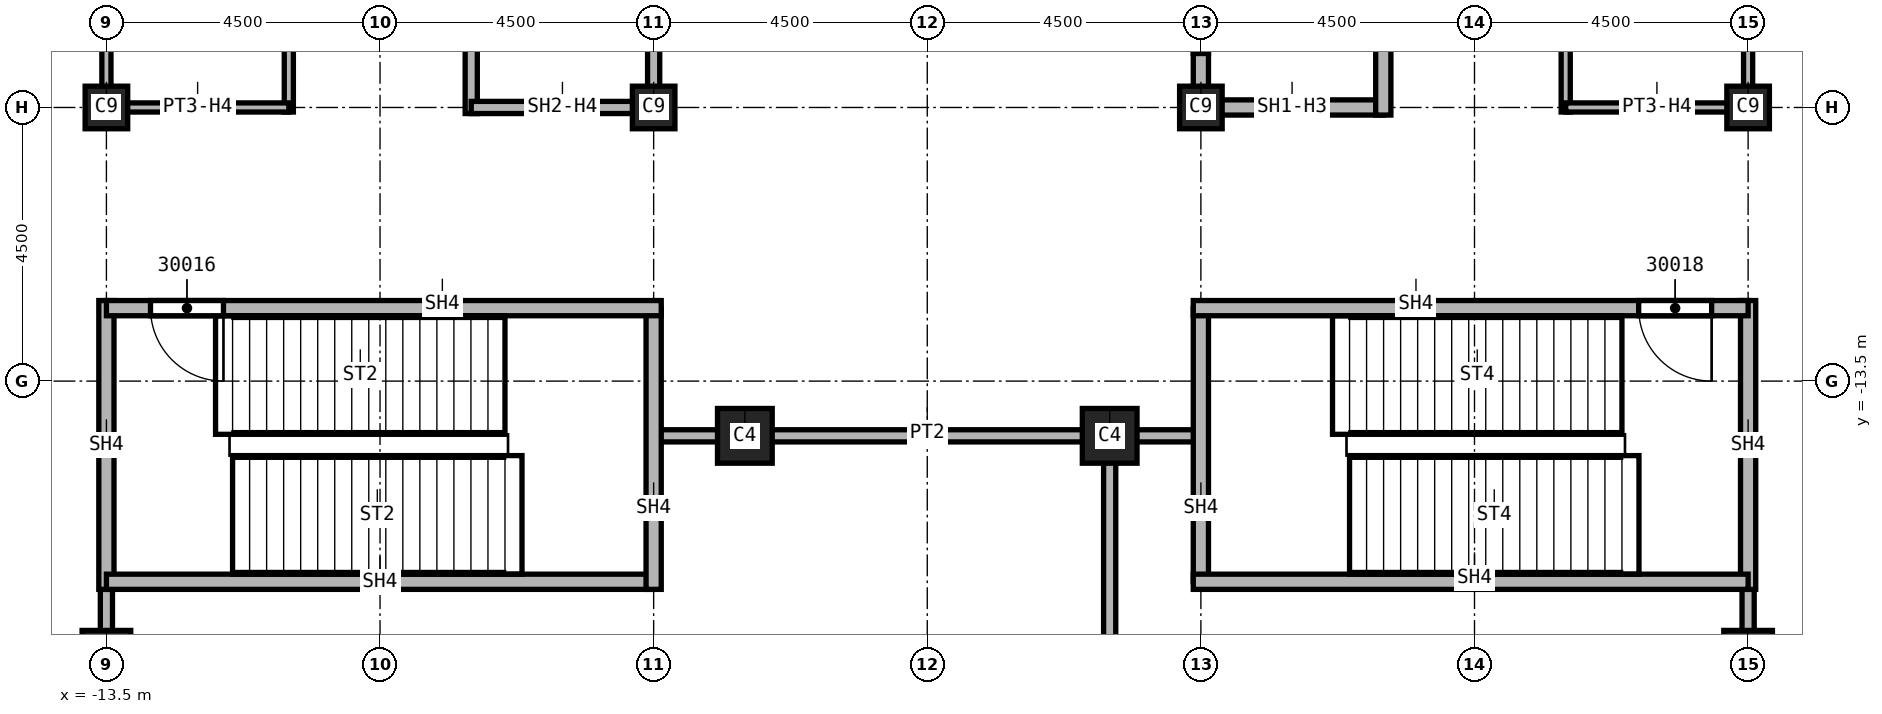
"""IFC4 building model, lengths in metres.
Left out: names, types, materials, properties, quantities, classifications, styles, units other than length and angle.
Written with IfcOpenShell. Run it as: python <this file> out.ifc"""

import sys

from ifc_helpers import new_model, si_unit, direction, frame, frame_2d, origin, origin_2d, place, context, subcontext, project, spatial, rectangle, extrude, element, fill, save


model = new_model("IFC4")
c1 = context("Model", 3, precision=1e-05, world=origin(), true_north=direction((0.0, 1.0)))
c2 = subcontext(c1, "Body", "Model", "MODEL_VIEW")
j1 = project(units=[si_unit("LENGTHUNIT", "METRE"), si_unit("PLANEANGLEUNIT", "RADIAN")], contexts=[c1])
p1 = place(None, origin())
s1 = spatial("IfcSite", under=j1, at=p1, CompositionType="ELEMENT")
p2 = place(p1, origin())
s2 = spatial("IfcBuilding", under=s1, at=p2, CompositionType="ELEMENT")
p3 = place(p2, frame((0.0, 0.0, 320.0)))
s3 = spatial("IfcBuildingStorey", under=s2, at=p3, CompositionType="ELEMENT", Elevation=320.0)
for number, where, z_axis, x_axis in (
    (1, (13.5, -18.0, 0.0), (0.0, 0.0, 1.0), (1.0, 0.0, 0.0)),
    (2, (-13.5, -18.0, 0.0), (0.0, 0.0, 1.0), (1.0, 0.0, 0.0)),
):
    element("IfcColumn", number, at=place(p3, frame(where, z_axis=z_axis, x_axis=x_axis)), inside=s3, PredefinedType="COLUMN", context=c2, shape_type="SweptSolid", body=[
        extrude(rectangle(XDim=0.8, YDim=0.8, at=origin_2d()), origin(), (0.0, 0.0, 1.0), 5.74),
    ])
for number, where, z_axis, x_axis in (
    (3, (4.5, -9.0, 0.0), (0.0, 0.0, 1.0), (1.0, 0.0, 0.0)),
    (4, (13.5, -9.0, 0.0), (0.0, 0.0, 1.0), (1.0, 0.0, 0.0)),
    (5, (-4.5, -9.0, 0.0), (0.0, 0.0, 1.0), (1.0, 0.0, 0.0)),
    (6, (-13.5, -9.0, 0.0), (0.0, 0.0, 1.0), (1.0, 0.0, 0.0)),
):
    element("IfcColumn", number, at=place(p3, frame(where, z_axis=z_axis, x_axis=x_axis)), inside=s3, PredefinedType="COLUMN", context=c2, shape_type="SweptSolid", body=[
        extrude(rectangle(XDim=0.7, YDim=0.7, at=origin_2d()), origin(), (0.0, 0.0, 1.0), 5.74),
    ])
for number, where, z_axis, x_axis in (
    (7, (3.0, -14.4, 0.0), (0.0, -0.329, 0.944), (1.0, 0.0, 0.0)),
    (8, (-3.0, -14.4, 0.0), (0.0, -0.329, 0.944), (1.0, 0.0, 0.0)),
):
    element("IfcColumn", number, at=place(p3, frame(where, z_axis=z_axis, x_axis=x_axis)), inside=s3, PredefinedType="COLUMN", context=c2, shape_type="SweptSolid", body=[
        extrude(rectangle(XDim=0.9, YDim=0.9, at=origin_2d()), origin(), (0.0, 0.0, 1.0), 6.078),
    ])
p4 = place(p3, frame((-13.5, -16.675, 0.0), z_axis=(0.0, 0.0, 1.0), x_axis=(0.0, -1.0, 0.0)))
e9 = element("IfcWall", 9, at=p4, inside=s3, PredefinedType="PARTITIONING", context=c2, shape_type="SweptSolid", body=[
    extrude(rectangle(XDim=6.275, YDim=0.2, at=frame_2d((3.137, 0.0))), origin(), (0.0, 0.0, 1.0), 5.74),
])
p5 = place(p4, frame((2.65, 0.0, 0.0)))
e10 = element("IfcOpeningElement", 10, at=p5, cuts=e9, PredefinedType="OPENING", context=c2, shape_type="SweptSolid", body=[
    extrude(rectangle(XDim=1.0, YDim=2.1, at=frame_2d((0.5, 1.05))), frame((0.0, 0.1, 0.0), z_axis=(0.0, -1.0, 0.0), x_axis=(1.0, 0.0, 0.0)), (0.0, 0.0, 1.0), 0.2),
])
p6 = place(p3, frame((4.5, -14.4, 0.0), z_axis=(0.0, 0.0, 1.0), x_axis=(-1.0, 0.0, 0.0)))
e11 = element("IfcWall", 11, at=p6, inside=s3, PredefinedType="PARTITIONING", context=c2, shape_type="SweptSolid", body=[
    extrude(rectangle(XDim=9.0, YDim=0.2, at=frame_2d((4.5, 0.0))), origin(), (0.0, 0.0, 1.0), 5.74),
])
p7 = place(p3, frame((3.0, -14.4, 0.0), z_axis=(0.0, 0.0, 1.0), x_axis=(0.0, -1.0, 0.0)))
e12 = element("IfcWall", 12, at=p7, inside=s3, PredefinedType="PARTITIONING", context=c2, shape_type="SweptSolid", body=[
    extrude(rectangle(XDim=8.55, YDim=0.2, at=frame_2d((4.275, 0.0))), origin(), (0.0, 0.0, 1.0), 5.74),
])
p8 = place(p3, frame((13.5, -22.95, 0.0), z_axis=(0.0, 0.0, 1.0), x_axis=(0.0, 1.0, 0.0)))
e13 = element("IfcWall", 13, at=p8, inside=s3, PredefinedType="PARTITIONING", context=c2, shape_type="SweptSolid", body=[
    extrude(rectangle(XDim=6.275, YDim=0.2, at=frame_2d((3.137, 0.0))), origin(), (0.0, 0.0, 1.0), 5.74),
])
p9 = place(p8, frame((1.75, 0.0, 0.0)))
e14 = element("IfcOpeningElement", 14, at=p9, cuts=e13, PredefinedType="OPENING", context=c2, shape_type="SweptSolid", body=[
    extrude(rectangle(XDim=1.0, YDim=2.1, at=frame_2d((0.5, 1.05))), frame((0.0, 0.1, 0.0), z_axis=(0.0, -1.0, 0.0), x_axis=(1.0, 0.0, 0.0)), (0.0, 0.0, 1.0), 0.2),
])
p10 = place(p3, frame((-7.5, -9.1, 0.0), z_axis=(0.0, 0.0, 1.0), x_axis=(0.0, 1.0, 0.0)))
e15 = element("IfcWall", 15, at=p10, inside=s3, PredefinedType="SOLIDWALL", context=c2, shape_type="SweptSolid", body=[
    extrude(rectangle(XDim=6.225, YDim=0.2, at=frame_2d((3.113, 0.0))), origin(), (0.0, 0.0, 1.0), 5.74),
])
p11 = place(p3, frame((-4.5, -9.0, 0.0), z_axis=(0.0, 0.0, 1.0), x_axis=(-1.0, 0.0, 0.0)))
e16 = element("IfcWall", 16, at=p11, inside=s3, PredefinedType="SOLIDWALL", context=c2, shape_type="SweptSolid", body=[
    extrude(rectangle(XDim=3.0, YDim=0.2, at=frame_2d((1.5, 0.0))), origin(), (0.0, 0.0, 1.0), 5.062),
])
p12 = place(p3, frame((-4.5, 6.0, 0.0), z_axis=(0.0, 0.0, 1.0), x_axis=(0.0, -1.0, 0.0)))
e17 = element("IfcWall", 17, at=p12, inside=s3, PredefinedType="SOLIDWALL", context=c2, shape_type="SweptSolid", body=[
    extrude(rectangle(XDim=15.1, YDim=0.2, at=frame_2d((7.55, 0.0))), origin(), (0.0, 0.0, 1.0), 5.062),
])
p13 = place(p12, frame((6.85, 0.0, 0.0)))
e18 = element("IfcOpeningElement", 18, at=p13, cuts=e17, PredefinedType="OPENING", context=c2, shape_type="SweptSolid", body=[
    extrude(rectangle(XDim=1.1, YDim=2.1, at=frame_2d((0.55, 1.05))), frame((0.0, 0.1, 0.0), z_axis=(0.0, -1.0, 0.0), x_axis=(1.0, 0.0, 0.0)), (0.0, 0.0, 1.0), 0.2),
])
p14 = place(p12, frame((1.6, 0.0, 0.0)))
e19 = element("IfcOpeningElement", 19, at=p14, cuts=e17, PredefinedType="OPENING", context=c2, shape_type="SweptSolid", body=[
    extrude(rectangle(XDim=1.1, YDim=2.1, at=frame_2d((0.55, 1.05))), frame((0.0, 0.1, 0.0), z_axis=(0.0, -1.0, 0.0), x_axis=(1.0, 0.0, 0.0)), (0.0, 0.0, 1.0), 0.2),
])
p15 = place(p3, frame((4.5, -9.125, 0.0), z_axis=(0.0, 0.0, 1.0), x_axis=(0.0, 1.0, 0.0)))
e20 = element("IfcWall", 20, at=p15, inside=s3, PredefinedType="SOLIDWALL", context=c2, shape_type="SweptSolid", body=[
    extrude(rectangle(XDim=3.125, YDim=0.25, at=frame_2d((1.562, 0.0))), origin(), (0.0, 0.0, 1.0), 5.062),
])
p16 = place(p15, frame((1.012, 0.0, 0.0)))
e21 = element("IfcOpeningElement", 21, at=p16, cuts=e20, PredefinedType="OPENING", context=c2, shape_type="SweptSolid", body=[
    extrude(rectangle(XDim=1.1, YDim=2.1, at=frame_2d((0.55, 1.05))), frame((0.0, 0.125, 0.0), z_axis=(0.0, -1.0, 0.0), x_axis=(1.0, 0.0, 0.0)), (0.0, 0.0, 1.0), 0.25),
])
p17 = place(p3, frame((7.5, -9.0, 0.0), z_axis=(0.0, 0.0, 1.0), x_axis=(-1.0, 0.0, 0.0)))
e22 = element("IfcWall", 22, at=p17, inside=s3, PredefinedType="SOLIDWALL", context=c2, shape_type="SweptSolid", body=[
    extrude(rectangle(XDim=3.0, YDim=0.25, at=frame_2d((1.5, 0.0))), origin(), (0.0, 0.0, 1.0), 5.062),
])
p18 = place(p3, frame((7.5, -6.0, 0.0), z_axis=(0.0, 0.0, 1.0), x_axis=(0.0, -1.0, 0.0)))
e23 = element("IfcWall", 23, at=p18, inside=s3, PredefinedType="SOLIDWALL", context=c2, shape_type="SweptSolid", body=[
    extrude(rectangle(XDim=3.125, YDim=0.25, at=frame_2d((1.562, 0.0))), origin(), (0.0, 0.0, 1.0), 5.74),
])
p19 = place(p3, frame((-13.5, -12.175, 0.0), z_axis=(0.0, 0.0, 1.0), x_axis=(0.0, -1.0, 0.0)))
e24 = element("IfcWall", 24, at=p19, inside=s3, PredefinedType="SOLIDWALL", context=c2, shape_type="SweptSolid", body=[
    extrude(rectangle(XDim=4.75, YDim=0.25, at=frame_2d((2.375, 0.0))), origin(), (0.0, 0.0, 1.0), 5.74),
])
p20 = place(p3, frame((-4.5, -16.8, 0.0), z_axis=(0.0, 0.0, 1.0), x_axis=(-1.0, 0.0, 0.0)))
e25 = element("IfcWall", 25, at=p20, inside=s3, PredefinedType="SOLIDWALL", context=c2, shape_type="SweptSolid", body=[
    extrude(rectangle(XDim=9.0, YDim=0.25, at=frame_2d((4.5, 0.0))), origin(), (0.0, 0.0, 1.0), 5.74),
])
p21 = place(p3, frame((-4.5, -12.3, 0.0), z_axis=(0.0, 0.0, 1.0), x_axis=(0.0, -1.0, 0.0)))
e26 = element("IfcWall", 26, at=p21, inside=s3, PredefinedType="SOLIDWALL", context=c2, shape_type="SweptSolid", body=[
    extrude(rectangle(XDim=4.625, YDim=0.25, at=frame_2d((2.312, 0.0))), origin(), (0.0, 0.0, 1.0), 5.74),
])
p22 = place(p3, frame((-4.375, -12.3, 0.0), z_axis=(0.0, 0.0, 1.0), x_axis=(-1.0, 0.0, 0.0)))
e27 = element("IfcWall", 27, at=p22, inside=s3, PredefinedType="SOLIDWALL", context=c2, shape_type="SweptSolid", body=[
    extrude(rectangle(XDim=9.125, YDim=0.25, at=frame_2d((4.562, 0.0))), origin(), (0.0, 0.0, 1.0), 5.74),
])
p23 = place(p22, frame((7.2, 0.0, 0.0)))
e28 = element("IfcOpeningElement", 28, at=p23, cuts=e27, PredefinedType="OPENING", context=c2, shape_type="SweptSolid", body=[
    extrude(rectangle(XDim=1.2, YDim=2.1, at=frame_2d((0.6, 1.05))), frame((0.0, 0.125, 0.0), z_axis=(0.0, -1.0, 0.0), x_axis=(1.0, 0.0, 0.0)), (0.0, 0.0, 1.0), 0.25),
])
p24 = place(p3, frame((4.5, -16.8, 0.0), z_axis=(0.0, 0.0, 1.0), x_axis=(0.0, 1.0, 0.0)))
e29 = element("IfcWall", 29, at=p24, inside=s3, PredefinedType="SOLIDWALL", context=c2, shape_type="SweptSolid", body=[
    extrude(rectangle(XDim=4.5, YDim=0.25, at=frame_2d((2.25, 0.0))), origin(), (0.0, 0.0, 1.0), 5.74),
])
p25 = place(p3, frame((13.5, -16.925, 0.0), z_axis=(0.0, 0.0, 1.0), x_axis=(0.0, 1.0, 0.0)))
e30 = element("IfcWall", 30, at=p25, inside=s3, PredefinedType="SOLIDWALL", context=c2, shape_type="SweptSolid", body=[
    extrude(rectangle(XDim=4.75, YDim=0.25, at=frame_2d((2.375, 0.0))), origin(), (0.0, 0.0, 1.0), 5.74),
])
p26 = place(p3, frame((13.5, -16.8, 0.0), z_axis=(0.0, 0.0, 1.0), x_axis=(-1.0, 0.0, 0.0)))
e31 = element("IfcWall", 31, at=p26, inside=s3, PredefinedType="SOLIDWALL", context=c2, shape_type="SweptSolid", body=[
    extrude(rectangle(XDim=9.125, YDim=0.25, at=frame_2d((4.562, 0.0))), origin(), (0.0, 0.0, 1.0), 5.74),
])
p27 = place(p3, frame((13.5, -12.3, 0.0), z_axis=(0.0, 0.0, 1.0), x_axis=(-1.0, 0.0, 0.0)))
e32 = element("IfcWall", 32, at=p27, inside=s3, PredefinedType="SOLIDWALL", context=c2, shape_type="SweptSolid", body=[
    extrude(rectangle(XDim=9.125, YDim=0.25, at=frame_2d((4.562, 0.0))), origin(), (0.0, 0.0, 1.0), 5.74),
])
p28 = place(p27, frame((0.6, 0.0, 0.0)))
e33 = element("IfcOpeningElement", 33, at=p28, cuts=e32, PredefinedType="OPENING", context=c2, shape_type="SweptSolid", body=[
    extrude(rectangle(XDim=1.2, YDim=2.1, at=frame_2d((0.6, 1.05))), frame((0.0, 0.125, 0.0), z_axis=(0.0, -1.0, 0.0), x_axis=(1.0, 0.0, 0.0)), (0.0, 0.0, 1.0), 0.25),
])
p29 = place(p3, frame((-13.5, -9.075, 0.0), z_axis=(0.0, 0.0, 1.0), x_axis=(0.0, 1.0, 0.0)))
e34 = element("IfcWall", 34, at=p29, inside=s3, PredefinedType="PARTITIONING", context=c2, shape_type="SweptSolid", body=[
    extrude(rectangle(XDim=4.075, YDim=0.15, at=frame_2d((2.038, 0.0))), origin(), (0.0, 0.0, 1.0), 5.062),
])
p30 = place(p3, frame((-10.5, -9.075, 0.0), z_axis=(0.0, 0.0, 1.0), x_axis=(0.0, 1.0, 0.0)))
e35 = element("IfcWall", 35, at=p30, inside=s3, PredefinedType="PARTITIONING", context=c2, shape_type="SweptSolid", body=[
    extrude(rectangle(XDim=4.15, YDim=0.15, at=frame_2d((2.075, 0.0))), origin(), (0.0, 0.0, 1.0), 5.74),
])
p31 = place(p30, frame((2.95, 0.0, 0.0)))
e36 = element("IfcOpeningElement", 36, at=p31, cuts=e35, PredefinedType="OPENING", context=c2, shape_type="SweptSolid", body=[
    extrude(rectangle(XDim=0.9, YDim=2.1, at=frame_2d((0.45, 1.05))), frame((0.0, 0.075, 0.0), z_axis=(0.0, -1.0, 0.0), x_axis=(1.0, 0.0, 0.0)), (0.0, 0.0, 1.0), 0.15),
])
p32 = place(p3, frame((-10.5, -9.0, 0.0), z_axis=(0.0, 0.0, 1.0), x_axis=(-1.0, 0.0, 0.0)))
e37 = element("IfcWall", 37, at=p32, inside=s3, PredefinedType="PARTITIONING", context=c2, shape_type="SweptSolid", body=[
    extrude(rectangle(XDim=3.0, YDim=0.15, at=frame_2d((1.5, 0.0))), origin(), (0.0, 0.0, 1.0), 5.062),
])
p33 = place(p3, frame((10.5, -2.875, 0.0), z_axis=(0.0, 0.0, 1.0), x_axis=(0.0, -1.0, 0.0)))
e38 = element("IfcWall", 38, at=p33, inside=s3, PredefinedType="PARTITIONING", context=c2, shape_type="SweptSolid", body=[
    extrude(rectangle(XDim=6.2, YDim=0.15, at=frame_2d((3.1, 0.0))), origin(), (0.0, 0.0, 1.0), 5.74),
])
p34 = place(p33, frame((0.85, 0.0, 0.0)))
e39 = element("IfcOpeningElement", 39, at=p34, cuts=e38, PredefinedType="OPENING", context=c2, shape_type="SweptSolid", body=[
    extrude(rectangle(XDim=0.9, YDim=2.1, at=frame_2d((0.45, 1.05))), frame((0.0, 0.075, 0.0), z_axis=(0.0, -1.0, 0.0), x_axis=(1.0, 0.0, 0.0)), (0.0, 0.0, 1.0), 0.15),
])
p35 = place(p3, frame((13.5, -9.0, 0.0), z_axis=(0.0, 0.0, 1.0), x_axis=(-1.0, 0.0, 0.0)))
e40 = element("IfcWall", 40, at=p35, inside=s3, PredefinedType="PARTITIONING", context=c2, shape_type="SweptSolid", body=[
    extrude(rectangle(XDim=3.0, YDim=0.15, at=frame_2d((1.5, 0.0))), origin(), (0.0, 0.0, 1.0), 5.062),
])
p36 = place(p3, frame((13.5, -3.0, 0.0), z_axis=(0.0, 0.0, 1.0), x_axis=(0.0, -1.0, 0.0)))
e41 = element("IfcWall", 41, at=p36, inside=s3, PredefinedType="PARTITIONING", context=c2, shape_type="SweptSolid", body=[
    extrude(rectangle(XDim=6.075, YDim=0.15, at=frame_2d((3.038, 0.0))), origin(), (0.0, 0.0, 1.0), 5.062),
])
p37 = place(p23, origin())
e42 = element("IfcDoor", 42, at=p37, inside=s3, OperationType="SINGLE_SWING_LEFT", PredefinedType="DOOR", context=c2, shape_type="SweptSolid", body=[
    extrude(rectangle(XDim=1.2, YDim=2.1, at=frame_2d((0.6, 1.05))), frame((0.0, 0.025, 0.0), z_axis=(0.0, -1.0, 0.0), x_axis=(1.0, 0.0, 0.0)), (0.0, 0.0, 1.0), 0.05),
])
fill(e28, e42)
p38 = place(p28, origin())
e43 = element("IfcDoor", 43, at=p38, inside=s3, OperationType="SINGLE_SWING_LEFT", PredefinedType="DOOR", context=c2, shape_type="SweptSolid", body=[
    extrude(rectangle(XDim=1.2, YDim=2.1, at=frame_2d((0.6, 1.05))), frame((0.0, 0.025, 0.0), z_axis=(0.0, -1.0, 0.0), x_axis=(1.0, 0.0, 0.0)), (0.0, 0.0, 1.0), 0.05),
])
fill(e33, e43)
p39 = place(p16, origin())
e44 = element("IfcDoor", 44, at=p39, inside=s3, OperationType="SLIDING_TO_LEFT", PredefinedType="DOOR", context=c2, shape_type="SweptSolid", body=[
    extrude(rectangle(XDim=1.1, YDim=2.1, at=frame_2d((0.55, 1.05))), frame((0.0, 0.025, 0.0), z_axis=(0.0, -1.0, 0.0), x_axis=(1.0, 0.0, 0.0)), (0.0, 0.0, 1.0), 0.05),
])
fill(e21, e44)
save(model, sys.argv[1])
